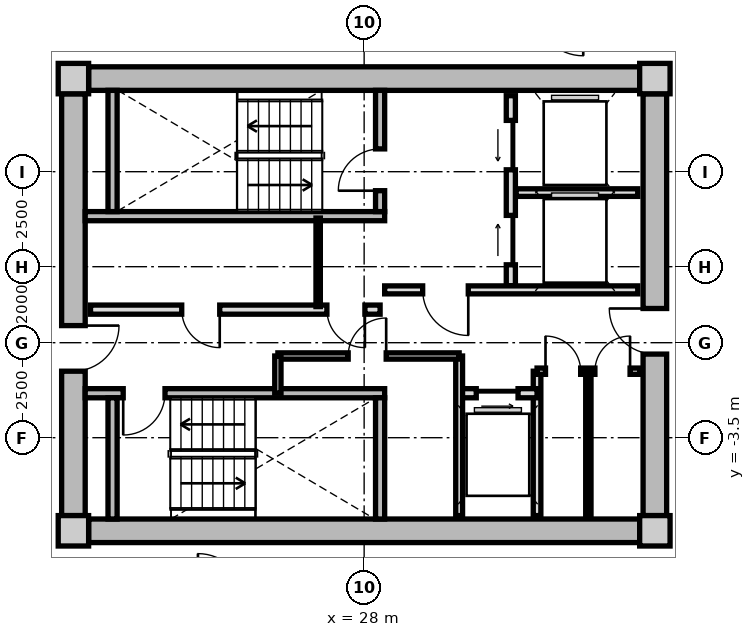
"""IFC4 building model, lengths in metres.
Left out: names, types, materials, properties, quantities, classifications, styles, units other than length and angle.
Written with IfcOpenShell. Run it as: python <this file> out.ifc"""

import sys

from ifc_helpers import new_model, si_unit, direction, frame, frame_2d, origin, origin_2d, place, context, subcontext, project, spatial, rectangle, extrude, source, transform, mapped, element, fill, save


model = new_model("IFC4")
c1 = context("Model", 3, precision=1e-05, world=origin(), true_north=direction((0.0, 1.0)))
c2 = subcontext(c1, "Body", "Model", "MODEL_VIEW")
j1 = project(units=[si_unit("LENGTHUNIT", "METRE"), si_unit("PLANEANGLEUNIT", "RADIAN")], contexts=[c1])
p1 = place(None, origin())
s1 = spatial("IfcSite", under=j1, at=p1, CompositionType="ELEMENT")
p2 = place(p1, origin())
s2 = spatial("IfcBuilding", under=s1, at=p2, CompositionType="ELEMENT")
p3 = place(p2, frame((0.0, 0.0, 161.75)))
s3 = spatial("IfcBuildingStorey", under=s2, at=p3, CompositionType="ELEMENT", Elevation=161.75)
m1 = source(origin(), c2, "Body", "SweptSolid", [
    extrude(rectangle(XDim=0.8, YDim=0.8, at=origin_2d()), origin(), (0.0, 0.0, 1.0), 3.05),
])
for number, where, z_axis, x_axis in (
    (1, (20.35, -5.95, 0.0), (0.0, 0.0, 1.0), (1.0, 0.0, 0.0)),
    (2, (35.65, -5.95, 0.0), (0.0, 0.0, 1.0), (1.0, 0.0, 0.0)),
    (3, (35.65, 5.95, 0.0), (0.0, 0.0, 1.0), (1.0, 0.0, 0.0)),
    (4, (20.35, 5.95, 0.0), (0.0, 0.0, 1.0), (1.0, 0.0, 0.0)),
):
    element("IfcColumn", number, at=place(p3, frame(where, z_axis=z_axis, x_axis=x_axis)), inside=s3, PredefinedType="COLUMN", context=c2, shape_type="MappedRepresentation", body=[
        mapped(m1, transform((0.0, 0.0, 0.0), x_axis=(1.0, 0.0, 0.0), y_axis=(0.0, 1.0, 0.0), z_axis=(0.0, 0.0, 1.0), scale=1.0)),
    ])
m2 = source(origin(), c2, "Body", "SweptSolid", [
    extrude(rectangle(XDim=14.5, YDim=0.62, at=frame_2d((7.25, 0.0))), origin(), (0.0, 0.0, 1.0), 2.81),
])
for number, where, z_axis, x_axis in (
    (5, (20.75, 5.95, 0.0), (0.0, 0.0, 1.0), (1.0, 0.0, 0.0)),
    (6, (35.25, -5.95, 0.0), (0.0, 0.0, 1.0), (-1.0, 0.0, 0.0)),
):
    element("IfcWall", number, at=place(p3, frame(where, z_axis=z_axis, x_axis=x_axis)), inside=s3, PredefinedType="SHEAR", context=c2, shape_type="MappedRepresentation", body=[
        mapped(m2, transform((0.0, 0.0, 0.0), x_axis=(1.0, 0.0, 0.0), y_axis=(0.0, 1.0, 0.0), z_axis=(0.0, 0.0, 1.0), scale=1.0)),
    ])
m3 = source(origin(), c2, "Body", "SweptSolid", [
    extrude(rectangle(XDim=11.1, YDim=0.62, at=frame_2d((5.55, 0.0))), origin(), (0.0, 0.0, 1.0), 2.81),
])
p4 = place(p3, frame((20.35, -5.55, 0.0), z_axis=(0.0, 0.0, 1.0), x_axis=(0.0, 1.0, 0.0)))
e7 = element("IfcWall", 7, at=p4, inside=s3, PredefinedType="SHEAR", context=c2, shape_type="MappedRepresentation", body=[
    mapped(m3, transform((0.0, 0.0, 0.0), x_axis=(1.0, 0.0, 0.0), y_axis=(0.0, 1.0, 0.0), z_axis=(0.0, 0.0, 1.0), scale=1.0)),
])
p5 = place(p4, frame((3.8, 0.0, 0.0)))
e8 = element("IfcOpeningElement", 8, at=p5, cuts=e7, PredefinedType="OPENING", context=c2, shape_type="SweptSolid", body=[
    extrude(rectangle(XDim=1.2, YDim=2.15, at=frame_2d((0.6, 1.075))), frame((0.0, 0.32, 0.0), z_axis=(0.0, -1.0, 0.0), x_axis=(1.0, 0.0, 0.0)), (0.0, 0.0, 1.0), 0.64),
])
p6 = place(p3, frame((35.65, 5.55, 0.0), z_axis=(0.0, 0.0, 1.0), x_axis=(0.0, -1.0, 0.0)))
e9 = element("IfcWall", 9, at=p6, inside=s3, PredefinedType="SHEAR", context=c2, shape_type="MappedRepresentation", body=[
    mapped(m3, transform((0.0, 0.0, 0.0), x_axis=(1.0, 0.0, 0.0), y_axis=(0.0, 1.0, 0.0), z_axis=(0.0, 0.0, 1.0), scale=1.0)),
])
p7 = place(p6, frame((5.65, 0.0, 0.0)))
e10 = element("IfcOpeningElement", 10, at=p7, cuts=e9, PredefinedType="OPENING", context=c2, shape_type="SweptSolid", body=[
    extrude(rectangle(XDim=1.2, YDim=2.15, at=frame_2d((0.6, 1.075))), frame((0.0, 0.32, 0.0), z_axis=(0.0, -1.0, 0.0), x_axis=(1.0, 0.0, 0.0)), (0.0, 0.0, 1.0), 0.64),
])
m4 = source(origin(), c2, "Body", "SweptSolid", [
    extrude(rectangle(XDim=7.88, YDim=0.24, at=frame_2d((3.94, 0.0))), origin(), (0.0, 0.0, 1.0), 2.81),
])
p8 = place(p3, frame((20.66, 2.33, 0.0), z_axis=(0.0, 0.0, 1.0), x_axis=(1.0, 0.0, 0.0)))
e11 = element("IfcWall", 11, at=p8, inside=s3, PredefinedType="PARTITIONING", context=c2, shape_type="MappedRepresentation", body=[
    mapped(m4, transform((0.0, 0.0, 0.0), x_axis=(1.0, 0.0, 0.0), y_axis=(0.0, 1.0, 0.0), z_axis=(0.0, 0.0, 1.0), scale=1.0)),
])
m5 = source(origin(), c2, "Body", "SweptSolid", [
    extrude(rectangle(XDim=3.19, YDim=0.24, at=frame_2d((1.595, 0.0))), origin(), (0.0, 0.0, 1.0), 2.81),
])
p9 = place(p3, frame((21.38, 2.45, 0.0), z_axis=(0.0, 0.0, 1.0), x_axis=(0.0, 1.0, 0.0)))
e12 = element("IfcWall", 12, at=p9, inside=s3, PredefinedType="PARTITIONING", context=c2, shape_type="MappedRepresentation", body=[
    mapped(m5, transform((0.0, 0.0, 0.0), x_axis=(1.0, 0.0, 0.0), y_axis=(0.0, 1.0, 0.0), z_axis=(0.0, 0.0, 1.0), scale=1.0)),
])
p10 = place(p3, frame((28.42, 2.45, 0.0), z_axis=(0.0, 0.0, 1.0), x_axis=(0.0, 1.0, 0.0)))
e13 = element("IfcWall", 13, at=p10, inside=s3, PredefinedType="PARTITIONING", context=c2, shape_type="MappedRepresentation", body=[
    mapped(m5, transform((0.0, 0.0, 0.0), x_axis=(1.0, 0.0, 0.0), y_axis=(0.0, 1.0, 0.0), z_axis=(0.0, 0.0, 1.0), scale=1.0)),
])
p11 = place(p10, frame((0.55, 0.0, 0.0)))
e14 = element("IfcOpeningElement", 14, at=p11, cuts=e13, PredefinedType="OPENING", context=c2, shape_type="SweptSolid", body=[
    extrude(rectangle(XDim=1.1, YDim=2.15, at=frame_2d((0.55, 1.075))), frame((0.0, 0.13, 0.0), z_axis=(0.0, -1.0, 0.0), x_axis=(1.0, 0.0, 0.0)), (0.0, 0.0, 1.0), 0.26),
])
p12 = place(p3, frame((20.66, -2.33, 0.0), z_axis=(0.0, 0.0, 1.0), x_axis=(1.0, 0.0, 0.0)))
e15 = element("IfcWall", 15, at=p12, inside=s3, PredefinedType="PARTITIONING", context=c2, shape_type="MappedRepresentation", body=[
    mapped(m4, transform((0.0, 0.0, 0.0), x_axis=(1.0, 0.0, 0.0), y_axis=(0.0, 1.0, 0.0), z_axis=(0.0, 0.0, 1.0), scale=1.0)),
])
p13 = place(p12, frame((1.0, 0.0, 0.0)))
e16 = element("IfcOpeningElement", 16, at=p13, cuts=e15, PredefinedType="OPENING", context=c2, shape_type="SweptSolid", body=[
    extrude(rectangle(XDim=1.1, YDim=2.15, at=frame_2d((0.55, 1.075))), frame((0.0, 0.13, 0.0), z_axis=(0.0, -1.0, 0.0), x_axis=(1.0, 0.0, 0.0)), (0.0, 0.0, 1.0), 0.26),
])
for number, where, z_axis, x_axis in (
    (17, (21.38, -5.64, 0.0), (0.0, 0.0, 1.0), (0.0, 1.0, 0.0)),
    (18, (28.42, -5.64, 0.0), (0.0, 0.0, 1.0), (0.0, 1.0, 0.0)),
):
    element("IfcWall", number, at=place(p3, frame(where, z_axis=z_axis, x_axis=x_axis)), inside=s3, PredefinedType="PARTITIONING", context=c2, shape_type="MappedRepresentation", body=[
        mapped(m5, transform((0.0, 0.0, 0.0), x_axis=(1.0, 0.0, 0.0), y_axis=(0.0, 1.0, 0.0), z_axis=(0.0, 0.0, 1.0), scale=1.0)),
    ])
m6 = source(origin(), c2, "Body", "SweptSolid", [
    extrude(rectangle(XDim=5.0, YDim=0.24, at=frame_2d((2.5, 0.0))), origin(), (0.0, 0.0, 1.0), 2.795),
])
p14 = place(p3, frame((31.86, 0.5, 0.0), z_axis=(0.0, 0.0, 1.0), x_axis=(0.0, 1.0, 0.0)))
e19 = element("IfcWall", 19, at=p14, inside=s3, PredefinedType="PARTITIONING", context=c2, shape_type="MappedRepresentation", body=[
    mapped(m6, transform((0.0, 0.0, 0.0), x_axis=(1.0, 0.0, 0.0), y_axis=(0.0, 1.0, 0.0), z_axis=(0.0, 0.0, 1.0), scale=1.0)),
])
p15 = place(p14, frame((3.05, 0.0, 0.0)))
e20 = element("IfcOpeningElement", 20, at=p15, cuts=e19, PredefinedType="OPENING", context=c2, shape_type="SweptSolid", body=[
    extrude(rectangle(XDim=1.3, YDim=2.2, at=frame_2d((0.65, 1.1))), frame((0.0, 0.13, 0.0), z_axis=(0.0, -1.0, 0.0), x_axis=(1.0, 0.0, 0.0)), (0.0, 0.0, 1.0), 0.26),
])
p16 = place(p14, frame((0.55, 0.0, 0.0)))
e21 = element("IfcOpeningElement", 21, at=p16, cuts=e19, PredefinedType="OPENING", context=c2, shape_type="SweptSolid", body=[
    extrude(rectangle(XDim=1.3, YDim=2.2, at=frame_2d((0.65, 1.1))), frame((0.0, 0.13, 0.0), z_axis=(0.0, -1.0, 0.0), x_axis=(1.0, 0.0, 0.0)), (0.0, 0.0, 1.0), 0.26),
])
m7 = source(origin(), c2, "Body", "SweptSolid", [
    extrude(rectangle(XDim=3.2, YDim=0.2, at=frame_2d((1.6, 0.0))), origin(), (0.0, 0.0, 1.0), 2.795),
])
p17 = place(p3, frame((32.0, 2.95, 0.0), z_axis=(0.0, 0.0, 1.0), x_axis=(1.0, 0.0, 0.0)))
e22 = element("IfcWall", 22, at=p17, inside=s3, PredefinedType="PARTITIONING", context=c2, shape_type="MappedRepresentation", body=[
    mapped(m7, transform((0.0, 0.0, 0.0), x_axis=(1.0, 0.0, 0.0), y_axis=(0.0, 1.0, 0.0), z_axis=(0.0, 0.0, 1.0), scale=1.0)),
])
m8 = source(origin(), c2, "Body", "SweptSolid", [
    extrude(rectangle(XDim=6.66, YDim=0.21, at=frame_2d((3.33, 0.0))), origin(), (0.0, 0.0, 1.0), 2.795),
])
p18 = place(p3, frame((28.54, 0.39, 0.0), z_axis=(0.0, 0.0, 1.0), x_axis=(1.0, 0.0, 0.0)))
e23 = element("IfcWall", 23, at=p18, inside=s3, PredefinedType="PARTITIONING", context=c2, shape_type="MappedRepresentation", body=[
    mapped(m8, transform((0.0, 0.0, 0.0), x_axis=(1.0, 0.0, 0.0), y_axis=(0.0, 1.0, 0.0), z_axis=(0.0, 0.0, 1.0), scale=1.0)),
])
p19 = place(p18, frame((1.0, 0.0, 0.0)))
e24 = element("IfcOpeningElement", 24, at=p19, cuts=e23, PredefinedType="OPENING", context=c2, shape_type="SweptSolid", body=[
    extrude(rectangle(XDim=1.2, YDim=2.15, at=frame_2d((0.6, 1.075))), frame((0.0, 0.115, 0.0), z_axis=(0.0, -1.0, 0.0), x_axis=(1.0, 0.0, 0.0)), (0.0, 0.0, 1.0), 0.23),
])
m9 = source(origin(), c2, "Body", "SweptSolid", [
    extrude(rectangle(XDim=7.62, YDim=0.24, at=frame_2d((3.81, 0.0))), origin(), (0.0, 0.0, 1.0), 2.795),
])
p20 = place(p3, frame((20.8, -0.13, 0.0), z_axis=(0.0, 0.0, 1.0), x_axis=(1.0, 0.0, 0.0)))
e25 = element("IfcWall", 25, at=p20, inside=s3, PredefinedType="PARTITIONING", context=c2, shape_type="MappedRepresentation", body=[
    mapped(m9, transform((0.0, 0.0, 0.0), x_axis=(1.0, 0.0, 0.0), y_axis=(0.0, 1.0, 0.0), z_axis=(0.0, 0.0, 1.0), scale=1.0)),
])
p21 = place(p20, frame((6.22, 0.0, 0.0)))
e26 = element("IfcOpeningElement", 26, at=p21, cuts=e25, PredefinedType="OPENING", context=c2, shape_type="SweptSolid", body=[
    extrude(rectangle(XDim=1.0, YDim=2.1, at=frame_2d((0.5, 1.05))), frame((0.0, 0.13, 0.0), z_axis=(0.0, -1.0, 0.0), x_axis=(1.0, 0.0, 0.0)), (0.0, 0.0, 1.0), 0.26),
])
p22 = place(p20, frame((2.4, 0.0, 0.0)))
e27 = element("IfcOpeningElement", 27, at=p22, cuts=e25, PredefinedType="OPENING", context=c2, shape_type="SweptSolid", body=[
    extrude(rectangle(XDim=1.0, YDim=2.1, at=frame_2d((0.5, 1.05))), frame((0.0, 0.13, 0.0), z_axis=(0.0, -1.0, 0.0), x_axis=(1.0, 0.0, 0.0)), (0.0, 0.0, 1.0), 0.26),
])
m10 = source(origin(), c2, "Body", "SweptSolid", [
    extrude(rectangle(XDim=2.33, YDim=0.115, at=frame_2d((1.165, 0.0))), origin(), (0.0, 0.0, 1.0), 2.795),
])
p23 = place(p3, frame((26.79, -0.05, 0.0), z_axis=(0.0, 0.0, 1.0), x_axis=(0.0, 1.0, 0.0)))
e28 = element("IfcWall", 28, at=p23, inside=s3, PredefinedType="PARTITIONING", context=c2, shape_type="MappedRepresentation", body=[
    mapped(m10, transform((0.0, 0.0, 0.0), x_axis=(1.0, 0.0, 0.0), y_axis=(0.0, 1.0, 0.0), z_axis=(0.0, 0.0, 1.0), scale=1.0)),
])
m11 = source(origin(), c2, "Body", "SweptSolid", [
    extrude(rectangle(XDim=3.8, YDim=0.2, at=frame_2d((1.9, 0.0))), origin(), (0.0, 0.0, 1.0), 2.795),
])
p24 = place(p3, frame((32.55, -5.55, 0.0), z_axis=(0.0, 0.0, 1.0), x_axis=(0.0, 1.0, 0.0)))
e29 = element("IfcWall", 29, at=p24, inside=s3, PredefinedType="PARTITIONING", context=c2, shape_type="MappedRepresentation", body=[
    mapped(m11, transform((0.0, 0.0, 0.0), x_axis=(1.0, 0.0, 0.0), y_axis=(0.0, 1.0, 0.0), z_axis=(0.0, 0.0, 1.0), scale=1.0)),
])
m12 = source(origin(), c2, "Body", "SweptSolid", [
    extrude(rectangle(XDim=2.05, YDim=0.24, at=frame_2d((1.025, 0.0))), origin(), (0.0, 0.0, 1.0), 2.795),
])
p25 = place(p3, frame((30.5, -2.33, 0.0), z_axis=(0.0, 0.0, 1.0), x_axis=(1.0, 0.0, 0.0)))
e30 = element("IfcWall", 30, at=p25, inside=s3, PredefinedType="PARTITIONING", context=c2, shape_type="MappedRepresentation", body=[
    mapped(m12, transform((0.0, 0.0, 0.0), x_axis=(1.0, 0.0, 0.0), y_axis=(0.0, 1.0, 0.0), z_axis=(0.0, 0.0, 1.0), scale=1.0)),
])
p26 = place(p25, frame((0.45, 0.0, 0.0)))
e31 = element("IfcOpeningElement", 31, at=p26, cuts=e30, PredefinedType="OPENING", context=c2, shape_type="SweptSolid", body=[
    extrude(rectangle(XDim=1.1, YDim=2.2, at=frame_2d((0.55, 1.1))), frame((0.0, 0.13, 0.0), z_axis=(0.0, -1.0, 0.0), x_axis=(1.0, 0.0, 0.0)), (0.0, 0.0, 1.0), 0.26),
])
m13 = source(origin(), c2, "Body", "SweptSolid", [
    extrude(rectangle(XDim=4.2, YDim=0.18, at=frame_2d((2.1, 0.0))), origin(), (0.0, 0.0, 1.0), 2.795),
])
p27 = place(p3, frame((30.5, -5.55, 0.0), z_axis=(0.0, 0.0, 1.0), x_axis=(0.0, 1.0, 0.0)))
e32 = element("IfcWall", 32, at=p27, inside=s3, PredefinedType="PARTITIONING", context=c2, shape_type="MappedRepresentation", body=[
    mapped(m13, transform((0.0, 0.0, 0.0), x_axis=(1.0, 0.0, 0.0), y_axis=(0.0, 1.0, 0.0), z_axis=(0.0, 0.0, 1.0), scale=1.0)),
])
m14 = source(origin(), c2, "Body", "SweptSolid", [
    extrude(rectangle(XDim=4.77, YDim=0.165, at=frame_2d((2.385, 0.0))), origin(), (0.0, 0.0, 1.0), 2.795),
])
p28 = place(p3, frame((25.73, -1.35, 0.0), z_axis=(0.0, 0.0, 1.0), x_axis=(1.0, 0.0, 0.0)))
e33 = element("IfcWall", 33, at=p28, inside=s3, PredefinedType="PARTITIONING", context=c2, shape_type="MappedRepresentation", body=[
    mapped(m14, transform((0.0, 0.0, 0.0), x_axis=(1.0, 0.0, 0.0), y_axis=(0.0, 1.0, 0.0), z_axis=(0.0, 0.0, 1.0), scale=1.0)),
])
p29 = place(p28, frame((1.85, 0.0, 0.0)))
e34 = element("IfcOpeningElement", 34, at=p29, cuts=e33, PredefinedType="OPENING", context=c2, shape_type="SweptSolid", body=[
    extrude(rectangle(XDim=1.0, YDim=2.1, at=frame_2d((0.5, 1.05))), frame((0.0, 0.093, 0.0), z_axis=(0.0, -1.0, 0.0), x_axis=(1.0, 0.0, 0.0)), (0.0, 0.0, 1.0), 0.185),
])
m15 = source(origin(), c2, "Body", "SweptSolid", [
    extrude(rectangle(XDim=0.98, YDim=0.165, at=frame_2d((0.49, 0.0))), origin(), (0.0, 0.0, 1.0), 2.795),
])
p30 = place(p3, frame((25.73, -2.33, 0.0), z_axis=(0.0, 0.0, 1.0), x_axis=(0.0, 1.0, 0.0)))
e35 = element("IfcWall", 35, at=p30, inside=s3, PredefinedType="PARTITIONING", context=c2, shape_type="MappedRepresentation", body=[
    mapped(m15, transform((0.0, 0.0, 0.0), x_axis=(1.0, 0.0, 0.0), y_axis=(0.0, 1.0, 0.0), z_axis=(0.0, 0.0, 1.0), scale=1.0)),
])
m16 = source(origin(), c2, "Body", "SweptSolid", [
    extrude(rectangle(XDim=2.7, YDim=0.165, at=frame_2d((1.35, 0.0))), origin(), (0.0, 0.0, 1.0), 2.795),
])
p31 = place(p3, frame((32.55, -1.75, 0.0), z_axis=(0.0, 0.0, 1.0), x_axis=(1.0, 0.0, 0.0)))
e36 = element("IfcWall", 36, at=p31, inside=s3, PredefinedType="PARTITIONING", context=c2, shape_type="MappedRepresentation", body=[
    mapped(m16, transform((0.0, 0.0, 0.0), x_axis=(1.0, 0.0, 0.0), y_axis=(0.0, 1.0, 0.0), z_axis=(0.0, 0.0, 1.0), scale=1.0)),
])
p32 = place(p31, frame((0.222, 0.0, 0.0)))
e37 = element("IfcOpeningElement", 37, at=p32, cuts=e36, PredefinedType="OPENING", context=c2, shape_type="SweptSolid", body=[
    extrude(rectangle(XDim=0.925, YDim=2.1, at=frame_2d((0.462, 1.05))), frame((0.0, 0.093, 0.0), z_axis=(0.0, -1.0, 0.0), x_axis=(1.0, 0.0, 0.0)), (0.0, 0.0, 1.0), 0.185),
])
p33 = place(p31, frame((1.522, 0.0, 0.0)))
e38 = element("IfcOpeningElement", 38, at=p33, cuts=e36, PredefinedType="OPENING", context=c2, shape_type="SweptSolid", body=[
    extrude(rectangle(XDim=0.925, YDim=2.1, at=frame_2d((0.462, 1.05))), frame((0.0, 0.093, 0.0), z_axis=(0.0, -1.0, 0.0), x_axis=(1.0, 0.0, 0.0)), (0.0, 0.0, 1.0), 0.185),
])
m17 = source(origin(), c2, "Body", "SweptSolid", [
    extrude(rectangle(XDim=3.8, YDim=0.14, at=frame_2d((1.9, 0.0))), origin(), (0.0, 0.0, 1.0), 2.795),
])
p34 = place(p3, frame((33.9, -5.55, 0.0), z_axis=(0.0, 0.0, 1.0), x_axis=(0.0, 1.0, 0.0)))
e39 = element("IfcWall", 39, at=p34, inside=s3, PredefinedType="PARTITIONING", context=c2, shape_type="MappedRepresentation", body=[
    mapped(m17, transform((0.0, 0.0, 0.0), x_axis=(1.0, 0.0, 0.0), y_axis=(0.0, 1.0, 0.0), z_axis=(0.0, 0.0, 1.0), scale=1.0)),
])
m18 = source(origin(), c2, "Body", "SweptSolid", [
    extrude(rectangle(XDim=1.1, YDim=2.15, at=frame_2d((0.55, 1.075))), frame((0.0, 0.025, 0.0), z_axis=(0.0, -1.0, 0.0), x_axis=(1.0, 0.0, 0.0)), (0.0, 0.0, 1.0), 0.05),
])
p35 = place(p11, origin())
e40 = element("IfcDoor", 40, at=p35, inside=s3, OperationType="SINGLE_SWING_LEFT", PredefinedType="DOOR", context=c2, shape_type="MappedRepresentation", body=[
    mapped(m18, transform((0.0, 0.0, 0.0), x_axis=(1.0, 0.0, 0.0), y_axis=(0.0, 1.0, 0.0), z_axis=(0.0, 0.0, 1.0), scale=1.0)),
])
fill(e14, e40)
p36 = place(p13, frame((1.1, 0.0, 0.0), z_axis=(0.0, 0.0, 1.0), x_axis=(-1.0, 0.0, 0.0)))
e41 = element("IfcDoor", 41, at=p36, inside=s3, OperationType="SINGLE_SWING_RIGHT", PredefinedType="DOOR", context=c2, shape_type="MappedRepresentation", body=[
    mapped(m18, transform((0.0, 0.0, 0.0), x_axis=(1.0, 0.0, 0.0), y_axis=(0.0, 1.0, 0.0), z_axis=(0.0, 0.0, 1.0), scale=1.0)),
])
fill(e16, e41)
m19 = source(origin(), c2, "Body", "SweptSolid", [
    extrude(rectangle(XDim=1.3, YDim=2.2, at=frame_2d((0.65, 1.1))), frame((0.0, 0.025, 0.0), z_axis=(0.0, -1.0, 0.0), x_axis=(1.0, 0.0, 0.0)), (0.0, 0.0, 1.0), 0.05),
])
p37 = place(p15, origin())
e42 = element("IfcDoor", 42, at=p37, inside=s3, OperationType="SLIDING_TO_LEFT", PredefinedType="DOOR", context=c2, shape_type="MappedRepresentation", body=[
    mapped(m19, transform((0.0, 0.0, 0.0), x_axis=(1.0, 0.0, 0.0), y_axis=(0.0, 1.0, 0.0), z_axis=(0.0, 0.0, 1.0), scale=1.0)),
])
fill(e20, e42)
p38 = place(p16, origin())
e43 = element("IfcDoor", 43, at=p38, inside=s3, OperationType="SLIDING_TO_RIGHT", PredefinedType="DOOR", context=c2, shape_type="MappedRepresentation", body=[
    mapped(m19, transform((0.0, 0.0, 0.0), x_axis=(1.0, 0.0, 0.0), y_axis=(0.0, 1.0, 0.0), z_axis=(0.0, 0.0, 1.0), scale=1.0)),
])
fill(e21, e43)
m20 = source(origin(), c2, "Body", "SweptSolid", [
    extrude(rectangle(XDim=1.2, YDim=2.15, at=frame_2d((0.6, 1.075))), frame((0.0, 0.025, 0.0), z_axis=(0.0, -1.0, 0.0), x_axis=(1.0, 0.0, 0.0)), (0.0, 0.0, 1.0), 0.05),
])
p39 = place(p19, frame((1.2, 0.0, 0.0), z_axis=(0.0, 0.0, 1.0), x_axis=(-1.0, 0.0, 0.0)))
e44 = element("IfcDoor", 44, at=p39, inside=s3, OperationType="SINGLE_SWING_LEFT", PredefinedType="DOOR", context=c2, shape_type="MappedRepresentation", body=[
    mapped(m20, transform((0.0, 0.0, 0.0), x_axis=(1.0, 0.0, 0.0), y_axis=(0.0, 1.0, 0.0), z_axis=(0.0, 0.0, 1.0), scale=1.0)),
])
fill(e24, e44)
p40 = place(p5, frame((1.2, 0.0, 0.0), z_axis=(0.0, 0.0, 1.0), x_axis=(-1.0, 0.0, 0.0)))
e45 = element("IfcDoor", 45, at=p40, inside=s3, OperationType="SINGLE_SWING_LEFT", PredefinedType="DOOR", context=c2, shape_type="MappedRepresentation", body=[
    mapped(m20, transform((0.0, 0.0, 0.0), x_axis=(1.0, 0.0, 0.0), y_axis=(0.0, 1.0, 0.0), z_axis=(0.0, 0.0, 1.0), scale=1.0)),
])
fill(e8, e45)
p41 = place(p7, frame((1.2, 0.0, 0.0), z_axis=(0.0, 0.0, 1.0), x_axis=(-1.0, 0.0, 0.0)))
e46 = element("IfcDoor", 46, at=p41, inside=s3, OperationType="SINGLE_SWING_RIGHT", PredefinedType="DOOR", context=c2, shape_type="MappedRepresentation", body=[
    mapped(m20, transform((0.0, 0.0, 0.0), x_axis=(1.0, 0.0, 0.0), y_axis=(0.0, 1.0, 0.0), z_axis=(0.0, 0.0, 1.0), scale=1.0)),
])
fill(e10, e46)
m21 = source(origin(), c2, "Body", "SweptSolid", [
    extrude(rectangle(XDim=1.0, YDim=2.1, at=frame_2d((0.5, 1.05))), frame((0.0, 0.025, 0.0), z_axis=(0.0, -1.0, 0.0), x_axis=(1.0, 0.0, 0.0)), (0.0, 0.0, 1.0), 0.05),
])
p42 = place(p21, frame((1.0, 0.0, 0.0), z_axis=(0.0, 0.0, 1.0), x_axis=(-1.0, 0.0, 0.0)))
e47 = element("IfcDoor", 47, at=p42, inside=s3, OperationType="SINGLE_SWING_LEFT", PredefinedType="DOOR", context=c2, shape_type="MappedRepresentation", body=[
    mapped(m21, transform((0.0, 0.0, 0.0), x_axis=(1.0, 0.0, 0.0), y_axis=(0.0, 1.0, 0.0), z_axis=(0.0, 0.0, 1.0), scale=1.0)),
])
fill(e26, e47)
p43 = place(p22, frame((1.0, 0.0, 0.0), z_axis=(0.0, 0.0, 1.0), x_axis=(-1.0, 0.0, 0.0)))
e48 = element("IfcDoor", 48, at=p43, inside=s3, OperationType="SINGLE_SWING_LEFT", PredefinedType="DOOR", context=c2, shape_type="MappedRepresentation", body=[
    mapped(m21, transform((0.0, 0.0, 0.0), x_axis=(1.0, 0.0, 0.0), y_axis=(0.0, 1.0, 0.0), z_axis=(0.0, 0.0, 1.0), scale=1.0)),
])
fill(e27, e48)
m22 = source(origin(), c2, "Body", "SweptSolid", [
    extrude(rectangle(XDim=1.1, YDim=2.2, at=frame_2d((0.55, 1.1))), frame((0.0, 0.025, 0.0), z_axis=(0.0, -1.0, 0.0), x_axis=(1.0, 0.0, 0.0)), (0.0, 0.0, 1.0), 0.05),
])
p44 = place(p26, frame((1.1, 0.0, 0.0), z_axis=(0.0, 0.0, 1.0), x_axis=(-1.0, 0.0, 0.0)))
e49 = element("IfcDoor", 49, at=p44, inside=s3, OperationType="SLIDING_TO_RIGHT", PredefinedType="DOOR", context=c2, shape_type="MappedRepresentation", body=[
    mapped(m22, transform((0.0, 0.0, 0.0), x_axis=(1.0, 0.0, 0.0), y_axis=(0.0, 1.0, 0.0), z_axis=(0.0, 0.0, 1.0), scale=1.0)),
])
fill(e31, e49)
p45 = place(p29, origin())
e50 = element("IfcDoor", 50, at=p45, inside=s3, OperationType="SINGLE_SWING_RIGHT", PredefinedType="DOOR", context=c2, shape_type="MappedRepresentation", body=[
    mapped(m21, transform((0.0, 0.0, 0.0), x_axis=(1.0, 0.0, 0.0), y_axis=(0.0, 1.0, 0.0), z_axis=(0.0, 0.0, 1.0), scale=1.0)),
])
fill(e34, e50)
m23 = source(origin(), c2, "Body", "SweptSolid", [
    extrude(rectangle(XDim=0.925, YDim=2.1, at=frame_2d((0.462, 1.05))), frame((0.0, 0.025, 0.0), z_axis=(0.0, -1.0, 0.0), x_axis=(1.0, 0.0, 0.0)), (0.0, 0.0, 1.0), 0.05),
])
p46 = place(p32, origin())
e51 = element("IfcDoor", 51, at=p46, inside=s3, OperationType="SINGLE_SWING_LEFT", PredefinedType="DOOR", context=c2, shape_type="MappedRepresentation", body=[
    mapped(m23, transform((0.0, 0.0, 0.0), x_axis=(1.0, 0.0, 0.0), y_axis=(0.0, 1.0, 0.0), z_axis=(0.0, 0.0, 1.0), scale=1.0)),
])
fill(e37, e51)
p47 = place(p33, origin())
e52 = element("IfcDoor", 52, at=p47, inside=s3, OperationType="SINGLE_SWING_RIGHT", PredefinedType="DOOR", context=c2, shape_type="MappedRepresentation", body=[
    mapped(m23, transform((0.0, 0.0, 0.0), x_axis=(1.0, 0.0, 0.0), y_axis=(0.0, 1.0, 0.0), z_axis=(0.0, 0.0, 1.0), scale=1.0)),
])
fill(e38, e52)
save(model, sys.argv[1])
